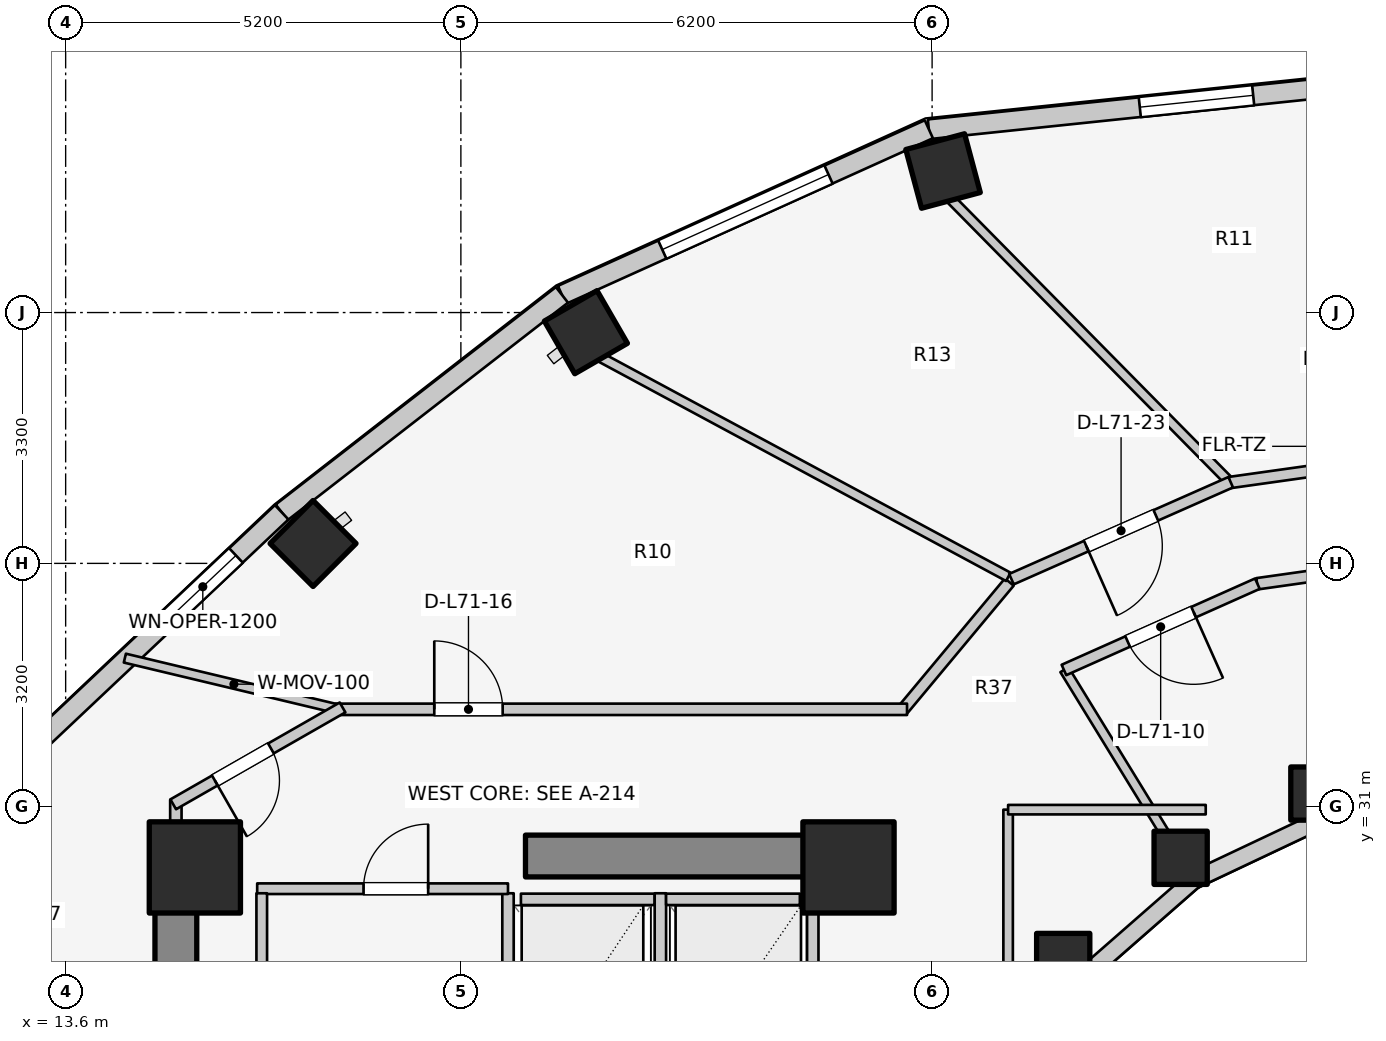
"""IFC4 building model, lengths in metres.
Left out: names, types, materials, properties, quantities, classifications, styles, units other than length and angle.
Written with IfcOpenShell. Run it as: python <this file> out.ifc"""

import sys

from ifc_helpers import new_model, si_unit, direction, frame, frame_2d, origin, origin_2d, place, context, subcontext, project, spatial, rectangle, extrude, element, fill, save


model = new_model("IFC4")
c1 = context("Model", 3, precision=1e-05, world=origin(), true_north=direction((0.0, 1.0)))
c2 = subcontext(c1, "Body", "Model", "MODEL_VIEW")
j1 = project(units=[si_unit("LENGTHUNIT", "METRE"), si_unit("PLANEANGLEUNIT", "RADIAN")], contexts=[c1])
p1 = place(None, origin())
s1 = spatial("IfcSite", under=j1, at=p1, CompositionType="ELEMENT")
p2 = place(p1, origin())
s2 = spatial("IfcBuilding", under=s1, at=p2, CompositionType="ELEMENT")
p3 = place(p2, frame((0.0, 0.0, 232.6)))
s3 = spatial("IfcBuildingStorey", under=s2, at=p3, CompositionType="ELEMENT", Elevation=232.6)
p4 = place(p3, frame((15.05, 17.05, 0.0), z_axis=(0.0, 0.0, 1.0), x_axis=(0.0, 1.0, 0.0)))
e1 = element("IfcWall", 1, at=p4, inside=s3, PredefinedType="SHEAR", context=c2, shape_type="SweptSolid", body=[
    extrude(rectangle(XDim=12.8, YDim=0.55, at=frame_2d((6.4, 0.0))), origin(), (0.0, 0.0, 1.0), 3.1),
])
p5 = place(p3, frame((19.65, 30.35, 0.0), z_axis=(0.0, 0.0, 1.0), x_axis=(1.0, 0.0, 0.0)))
e2 = element("IfcWall", 2, at=p5, inside=s3, PredefinedType="SHEAR", context=c2, shape_type="SweptSolid", body=[
    extrude(rectangle(XDim=4.5, YDim=0.55, at=frame_2d((2.25, 0.0))), origin(), (0.0, 0.0, 1.0), 3.1),
])
for number, where, z_axis, x_axis in (
    (3, (23.9, 30.2, 0.0), (0.0, 0.0, 1.0), (1.0, 0.0, 0.0)),
    (4, (15.3, 30.2, 0.0), (0.0, 0.0, 1.0), (1.0, 0.0, 0.0)),
):
    element("IfcColumn", number, at=place(p3, frame(where, z_axis=z_axis, x_axis=x_axis)), inside=s3, PredefinedType="COLUMN", context=c2, shape_type="SweptSolid", body=[
        extrude(rectangle(XDim=1.2, YDim=1.2, at=origin_2d()), origin(), (0.0, 0.0, 1.0), 3.1),
    ])
p6 = place(p3, frame((30.069, 31.172, 0.0), z_axis=(0.0, 0.0, 1.0), x_axis=(1.0, 0.0, 0.0)))
e5 = element("IfcColumn", 5, at=p6, inside=s3, PredefinedType="COLUMN", context=c2, shape_type="SweptSolid", body=[
    extrude(rectangle(XDim=0.7, YDim=0.7, at=origin_2d()), origin(), (0.0, 0.0, 1.0), 3.1),
])
p7 = place(p3, frame((25.144, 39.362, 0.0), z_axis=(0.0, 0.0, 1.0), x_axis=(-0.258819045103, 0.965925826289, 0.0)))
e6 = element("IfcColumn", 6, at=p7, inside=s3, PredefinedType="COLUMN", context=c2, shape_type="SweptSolid", body=[
    extrude(rectangle(XDim=0.8, YDim=0.8, at=origin_2d()), origin(), (0.0, 0.0, 1.0), 3.1),
])
p8 = place(p3, frame((28.27, 30.327, 0.0), z_axis=(0.0, 0.0, 1.0), x_axis=(1.0, 0.0, 0.0)))
e7 = element("IfcColumn", 7, at=p8, inside=s3, PredefinedType="COLUMN", context=c2, shape_type="SweptSolid", body=[
    extrude(rectangle(XDim=0.7, YDim=0.7, at=origin_2d()), origin(), (0.0, 0.0, 1.0), 3.1),
])
p9 = place(p3, frame((20.445, 37.241, 0.0), z_axis=(0.0, 0.0, 1.0), x_axis=(-0.5, 0.866025403784, 0.0)))
e8 = element("IfcColumn", 8, at=p9, inside=s3, PredefinedType="COLUMN", context=c2, shape_type="SweptSolid", body=[
    extrude(rectangle(XDim=0.8, YDim=0.8, at=origin_2d()), origin(), (0.0, 0.0, 1.0), 3.1),
])
p10 = place(p3, frame((26.725, 28.982, 0.0), z_axis=(0.0, 0.0, 1.0), x_axis=(1.0, 0.0, 0.0)))
e9 = element("IfcColumn", 9, at=p10, inside=s3, PredefinedType="COLUMN", context=c2, shape_type="SweptSolid", body=[
    extrude(rectangle(XDim=0.7, YDim=0.7, at=origin_2d()), origin(), (0.0, 0.0, 1.0), 3.1),
])
p11 = place(p3, frame((16.855, 34.462, 0.0), z_axis=(0.0, 0.0, 1.0), x_axis=(-0.707106781187, 0.707106781187, 0.0)))
e10 = element("IfcColumn", 10, at=p11, inside=s3, PredefinedType="COLUMN", context=c2, shape_type="SweptSolid", body=[
    extrude(rectangle(XDim=0.8, YDim=0.8, at=origin_2d()), origin(), (0.0, 0.0, 1.0), 3.1),
])
p12 = place(p3, frame((30.157, 30.843, 0.0), z_axis=(0.0, 0.0, 1.0), x_axis=(-0.904179699603, -0.427152280606, 0.0)))
e11 = element("IfcWall", 11, at=p12, inside=s3, PredefinedType="STANDARD", context=c2, shape_type="SweptSolid", body=[
    extrude(rectangle(XDim=1.899, YDim=0.23, at=frame_2d((0.95, 0.0))), origin(), (0.0, 0.0, 1.0), 2.16),
])
p13 = place(p3, frame((28.44, 30.032, 0.0), z_axis=(0.0, 0.0, 1.0), x_axis=(-0.752576694707, -0.658504607869, 0.0)))
e12 = element("IfcWall", 12, at=p13, inside=s3, PredefinedType="STANDARD", context=c2, shape_type="SweptSolid", body=[
    extrude(rectangle(XDim=1.959, YDim=0.23, at=frame_2d((0.98, 0.0))), origin(), (0.0, 0.0, 1.0), 2.16),
])
p14 = place(p3, frame((32.0, 40.648, 0.0), z_axis=(0.0, 0.0, 1.0), x_axis=(-0.994582822721, -0.103947144014, 0.0)))
e13 = element("IfcWall", 13, at=p14, inside=s3, PredefinedType="STANDARD", context=c2, shape_type="SweptSolid", body=[
    extrude(rectangle(XDim=7.081, YDim=0.26, at=frame_2d((3.541, 0.0))), origin(), (0.0, 0.0, 1.0), 2.85),
])
p15 = place(p14, frame((2.791, 0.0, 0.75)))
e14 = element("IfcOpeningElement", 14, at=p15, cuts=e13, PredefinedType="OPENING", context=c2, shape_type="SweptSolid", body=[
    extrude(rectangle(XDim=1.5, YDim=1.6, at=frame_2d((0.75, 0.8))), frame((0.0, 0.14, 0.0), z_axis=(0.0, -1.0, 0.0), x_axis=(1.0, 0.0, 0.0)), (0.0, 0.0, 1.0), 0.28),
])
p16 = place(p3, frame((24.957, 39.912, 0.0), z_axis=(0.0, 0.0, 1.0), x_axis=(-0.911427484938, -0.411460738952, 0.0)))
e15 = element("IfcWall", 15, at=p16, inside=s3, PredefinedType="STANDARD", context=c2, shape_type="SweptSolid", body=[
    extrude(rectangle(XDim=5.296, YDim=0.26, at=frame_2d((2.648, 0.0))), origin(), (0.0, 0.0, 1.0), 2.85),
])
p17 = place(p16, frame((1.448, 0.0, 0.75)))
e16 = element("IfcOpeningElement", 16, at=p17, cuts=e15, PredefinedType="OPENING", context=c2, shape_type="SweptSolid", body=[
    extrude(rectangle(XDim=2.4, YDim=1.7, at=frame_2d((1.2, 0.85))), frame((0.0, 0.14, 0.0), z_axis=(0.0, -1.0, 0.0), x_axis=(1.0, 0.0, 0.0)), (0.0, 0.0, 1.0), 0.28),
])
p18 = place(p3, frame((20.13, 37.733, 0.0), z_axis=(0.0, 0.0, 1.0), x_axis=(-0.790126214723, -0.612944177563, 0.0)))
e17 = element("IfcWall", 17, at=p18, inside=s3, PredefinedType="STANDARD", context=c2, shape_type="SweptSolid", body=[
    extrude(rectangle(XDim=4.667, YDim=0.26, at=frame_2d((2.333, 0.0))), origin(), (0.0, 0.0, 1.0), 2.85),
])
p19 = place(p3, frame((16.442, 34.872, 0.0), z_axis=(0.0, 0.0, 1.0), x_axis=(-0.72731899451, -0.686299555752, 0.0)))
e18 = element("IfcWall", 18, at=p19, inside=s3, PredefinedType="STANDARD", context=c2, shape_type="SweptSolid", body=[
    extrude(rectangle(XDim=4.404, YDim=0.26, at=frame_2d((2.202, 0.0))), origin(), (0.0, 0.0, 1.0), 2.85),
])
p20 = place(p19, frame((0.827, 0.0, 0.75)))
e19 = element("IfcOpeningElement", 19, at=p20, cuts=e18, PredefinedType="OPENING", context=c2, shape_type="SweptSolid", body=[
    extrude(rectangle(XDim=1.2, YDim=1.5, at=frame_2d((0.6, 0.75))), frame((0.0, 0.14, 0.0), z_axis=(0.0, -1.0, 0.0), x_axis=(1.0, 0.0, 0.0)), (0.0, 0.0, 1.0), 0.28),
])
p21 = place(p3, frame((19.59, 29.78, 0.0), z_axis=(0.0, 0.0, 1.0), x_axis=(1.0, 0.0, 0.0)))
e20 = element("IfcWall", 20, at=p21, inside=s3, PredefinedType="SOLIDWALL", context=c2, shape_type="SweptSolid", body=[
    extrude(rectangle(XDim=1.76, YDim=0.15, at=frame_2d((0.88, 0.0))), origin(), (0.0, 0.0, 1.0), 2.855),
])
for number, where, z_axis, x_axis in (
    (21, (19.42, 27.14, 0.0), (0.0, 0.0, 1.0), (0.0, 1.0, 0.0)),
    (22, (21.425, 27.14, 0.0), (0.0, 0.0, 1.0), (0.0, 1.0, 0.0)),
):
    element("IfcWall", number, at=place(p3, frame(where, z_axis=z_axis, x_axis=x_axis)), inside=s3, PredefinedType="SOLIDWALL", context=c2, shape_type="SweptSolid", body=[
        extrude(rectangle(XDim=2.72, YDim=0.15, at=frame_2d((1.36, 0.0))), origin(), (0.0, 0.0, 1.0), 2.855),
    ])
p22 = place(p3, frame((21.5, 29.78, 0.0), z_axis=(0.0, 0.0, 1.0), x_axis=(1.0, 0.0, 0.0)))
e23 = element("IfcWall", 23, at=p22, inside=s3, PredefinedType="SOLIDWALL", context=c2, shape_type="SweptSolid", body=[
    extrude(rectangle(XDim=1.76, YDim=0.15, at=frame_2d((0.88, 0.0))), origin(), (0.0, 0.0, 1.0), 2.855),
])
p23 = place(p3, frame((23.43, 27.14, 0.0), z_axis=(0.0, 0.0, 1.0), x_axis=(0.0, 1.0, 0.0)))
e24 = element("IfcWall", 24, at=p23, inside=s3, PredefinedType="SOLIDWALL", context=c2, shape_type="SweptSolid", body=[
    extrude(rectangle(XDim=2.72, YDim=0.15, at=frame_2d((1.36, 0.0))), origin(), (0.0, 0.0, 1.0), 2.855),
])
p24 = place(p3, frame((16.12, 29.92, 0.0), z_axis=(0.0, 0.0, 1.0), x_axis=(1.0, 0.0, 0.0)))
e25 = element("IfcWall", 25, at=p24, inside=s3, PredefinedType="PLUMBINGWALL", context=c2, shape_type="SweptSolid", body=[
    extrude(rectangle(XDim=3.3, YDim=0.14, at=frame_2d((1.65, 0.0))), origin(), (0.0, 0.0, 1.0), 2.855),
])
p25 = place(p24, frame((1.399, 0.0, 0.0)))
e26 = element("IfcOpeningElement", 26, at=p25, cuts=e25, PredefinedType="OPENING", context=c2, shape_type="SweptSolid", body=[
    extrude(rectangle(XDim=0.85, YDim=2.05, at=frame_2d((0.425, 1.025))), frame((0.0, 0.08, 0.0), z_axis=(0.0, -1.0, 0.0), x_axis=(1.0, 0.0, 0.0)), (0.0, 0.0, 1.0), 0.16),
])
p26 = place(p3, frame((16.18, 25.98, 0.0), z_axis=(0.0, 0.0, 1.0), x_axis=(0.0, 1.0, 0.0)))
e27 = element("IfcWall", 27, at=p26, inside=s3, PredefinedType="PLUMBINGWALL", context=c2, shape_type="SweptSolid", body=[
    extrude(rectangle(XDim=3.88, YDim=0.14, at=frame_2d((1.94, 0.0))), origin(), (0.0, 0.0, 1.0), 2.855),
])
p27 = place(p3, frame((28.45, 30.015, 0.0), z_axis=(0.0, 0.0, 1.0), x_axis=(-0.522763432117, 0.852477796802, 0.0)))
e28 = element("IfcWall", 28, at=p27, inside=s3, PredefinedType="PARTITIONING", context=c2, shape_type="SweptSolid", body=[
    extrude(rectangle(XDim=3.269, YDim=0.125, at=frame_2d((1.635, 0.0))), origin(), (0.0, 0.0, 1.0), 2.376),
])
p28 = place(p3, frame((32.007, 34.318, 0.0), z_axis=(0.0, 0.0, 1.0), x_axis=(-0.990150268487, -0.140008734782, 0.0)))
e29 = element("IfcWall", 29, at=p28, inside=s3, PredefinedType="PARTITIONING", context=c2, shape_type="SweptSolid", body=[
    extrude(rectangle(XDim=2.759, YDim=0.15, at=frame_2d((1.379, 0.0))), origin(), (0.0, 0.0, 1.0), 2.376),
])
p29 = place(p3, frame((29.28, 33.933, 0.0), z_axis=(0.0, 0.0, 1.0), x_axis=(-0.913254317828, -0.407389924971, 0.0)))
e30 = element("IfcWall", 30, at=p29, inside=s3, PredefinedType="PARTITIONING", context=c2, shape_type="SweptSolid", body=[
    extrude(rectangle(XDim=2.787, YDim=0.15, at=frame_2d((1.393, 0.0))), origin(), (0.0, 0.0, 1.0), 2.376),
])
p30 = place(p29, frame((0.918, 0.0, 0.0)))
e31 = element("IfcOpeningElement", 31, at=p30, cuts=e30, PredefinedType="OPENING", context=c2, shape_type="SweptSolid", body=[
    extrude(rectangle(XDim=0.95, YDim=2.1, at=frame_2d((0.475, 1.05))), frame((0.0, 0.085, 0.0), z_axis=(0.0, -1.0, 0.0), x_axis=(1.0, 0.0, 0.0)), (0.0, 0.0, 1.0), 0.17),
])
p31 = place(p3, frame((26.0, 25.8, 0.0), z_axis=(0.0, 0.0, 1.0), x_axis=(0.0, 1.0, 0.0)))
e32 = element("IfcWall", 32, at=p31, inside=s3, PredefinedType="PARTITIONING", context=c2, shape_type="SweptSolid", body=[
    extrude(rectangle(XDim=5.16, YDim=0.125, at=frame_2d((2.58, 0.0))), origin(), (0.0, 0.0, 1.0), 2.232),
])
p32 = place(p3, frame((26.0, 30.96, 0.0), z_axis=(0.0, 0.0, 1.0), x_axis=(1.0, 0.0, 0.0)))
e33 = element("IfcWall", 33, at=p32, inside=s3, PredefinedType="PARTITIONING", context=c2, shape_type="SweptSolid", body=[
    extrude(rectangle(XDim=2.6, YDim=0.125, at=frame_2d((1.3, 0.0))), origin(), (0.0, 0.0, 1.0), 2.376),
])
p33 = place(p3, frame((15.05, 29.8, 0.0), z_axis=(0.0, 0.0, 1.0), x_axis=(0.0, 1.0, 0.0)))
e34 = element("IfcWall", 34, at=p33, inside=s3, PredefinedType="PARTITIONING", context=c2, shape_type="SweptSolid", body=[
    extrude(rectangle(XDim=1.29, YDim=0.15, at=frame_2d((0.645, 0.0))), origin(), (0.0, 0.0, 1.0), 2.855),
])
p34 = place(p3, frame((17.249, 32.268, 0.0), z_axis=(0.0, 0.0, 1.0), x_axis=(-0.972648835931, 0.232280524286, 0.0)))
e35 = element("IfcWall", 35, at=p34, inside=s3, PredefinedType="MOVABLE", context=c2, shape_type="SweptSolid", body=[
    extrude(rectangle(XDim=2.95, YDim=0.12, at=frame_2d((1.475, 0.0))), origin(), (0.0, 0.0, 1.0), 2.22),
])
p35 = place(p3, frame((26.016, 33.955, 0.0), z_axis=(0.0, 0.0, 1.0), x_axis=(-0.64030392053, -0.76812166312, 0.0)))
e36 = element("IfcWall", 36, at=p35, inside=s3, PredefinedType="PARTITIONING", context=c2, shape_type="SweptSolid", body=[
    extrude(rectangle(XDim=2.21, YDim=0.15, at=frame_2d((1.105, 0.0))), origin(), (0.0, 0.0, 1.0), 2.376),
])
p36 = place(p3, frame((17.15, 32.28, 0.0), z_axis=(0.0, 0.0, 1.0), x_axis=(1.0, 0.0, 0.0)))
e37 = element("IfcWall", 37, at=p36, inside=s3, PredefinedType="PARTITIONING", context=c2, shape_type="SweptSolid", body=[
    extrude(rectangle(XDim=7.52, YDim=0.15, at=frame_2d((3.76, 0.0))), origin(), (0.0, 0.0, 1.0), 2.376),
])
p37 = place(p36, frame((1.3, 0.0, 0.0)))
e38 = element("IfcOpeningElement", 38, at=p37, cuts=e37, PredefinedType="OPENING", context=c2, shape_type="SweptSolid", body=[
    extrude(rectangle(XDim=0.9, YDim=2.1, at=frame_2d((0.45, 1.05))), frame((0.0, 0.085, 0.0), z_axis=(0.0, -1.0, 0.0), x_axis=(1.0, 0.0, 0.0)), (0.0, 0.0, 1.0), 0.17),
])
p38 = place(p3, frame((17.243, 32.305, 0.0), z_axis=(0.0, 0.0, 1.0), x_axis=(-0.867991349648, -0.496579315857, 0.0)))
e39 = element("IfcWall", 39, at=p38, inside=s3, PredefinedType="PARTITIONING", context=c2, shape_type="SweptSolid", body=[
    extrude(rectangle(XDim=2.567, YDim=0.15, at=frame_2d((1.283, 0.0))), origin(), (0.0, 0.0, 1.0), 2.22),
])
p39 = place(p38, frame((1.086, 0.0, 0.0)))
e40 = element("IfcOpeningElement", 40, at=p39, cuts=e39, PredefinedType="OPENING", context=c2, shape_type="SweptSolid", body=[
    extrude(rectangle(XDim=0.85, YDim=2.05, at=frame_2d((0.425, 1.025))), frame((0.0, 0.085, 0.0), z_axis=(0.0, -1.0, 0.0), x_axis=(1.0, 0.0, 0.0)), (0.0, 0.0, 1.0), 0.17),
])
p40 = place(p3, frame((28.882, 35.304, 0.0), z_axis=(0.0, 0.0, 1.0), x_axis=(-0.702191571271, 0.711988059756, 0.0)))
e41 = element("IfcWall", 41, at=p40, inside=s3, PredefinedType="PARTITIONING", context=c2, shape_type="SweptSolid", body=[
    extrude(rectangle(XDim=5.184, YDim=0.125, at=frame_2d((2.592, 0.0))), origin(), (0.0, 0.0, 1.0), 2.376),
])
p41 = place(p3, frame((26.003, 34.023, 0.0), z_axis=(0.0, 0.0, 1.0), x_axis=(-0.880531534665, 0.473987569943, 0.0)))
e42 = element("IfcWall", 42, at=p41, inside=s3, PredefinedType="PARTITIONING", context=c2, shape_type="SweptSolid", body=[
    extrude(rectangle(XDim=6.096, YDim=0.125, at=frame_2d((3.048, 0.0))), origin(), (0.0, 0.0, 1.0), 2.376),
])
p42 = place(p3, frame((32.008, 35.698, 0.0), z_axis=(0.0, 0.0, 1.0), x_axis=(-0.990268690673, -0.139168675614, 0.0)))
e43 = element("IfcWall", 43, at=p42, inside=s3, PredefinedType="PARTITIONING", context=c2, shape_type="SweptSolid", body=[
    extrude(rectangle(XDim=3.126, YDim=0.15, at=frame_2d((1.563, 0.0))), origin(), (0.0, 0.0, 1.0), 2.376),
])
p43 = place(p42, frame((1.063, 0.0, 0.0)))
e44 = element("IfcOpeningElement", 44, at=p43, cuts=e43, PredefinedType="OPENING", context=c2, shape_type="SweptSolid", body=[
    extrude(rectangle(XDim=1.0, YDim=2.1, at=frame_2d((0.5, 1.05))), frame((0.0, 0.085, 0.0), z_axis=(0.0, -1.0, 0.0), x_axis=(1.0, 0.0, 0.0)), (0.0, 0.0, 1.0), 0.17),
])
p44 = place(p3, frame((28.929, 35.268, 0.0), z_axis=(0.0, 0.0, 1.0), x_axis=(-0.914642679993, -0.404263240891, 0.0)))
e45 = element("IfcWall", 45, at=p44, inside=s3, PredefinedType="PARTITIONING", context=c2, shape_type="SweptSolid", body=[
    extrude(rectangle(XDim=3.154, YDim=0.15, at=frame_2d((1.577, 0.0))), origin(), (0.0, 0.0, 1.0), 2.376),
])
p45 = place(p44, frame((1.077, 0.0, 0.0)))
e46 = element("IfcOpeningElement", 46, at=p45, cuts=e45, PredefinedType="OPENING", context=c2, shape_type="SweptSolid", body=[
    extrude(rectangle(XDim=1.0, YDim=2.1, at=frame_2d((0.5, 1.05))), frame((0.0, 0.085, 0.0), z_axis=(0.0, -1.0, 0.0), x_axis=(1.0, 0.0, 0.0)), (0.0, 0.0, 1.0), 0.17),
])
p46 = place(p15, origin())
e47 = element("IfcWindow", 47, at=p46, inside=s3, PartitioningType="SINGLE_PANEL", PredefinedType="WINDOW", context=c2, shape_type="SweptSolid", body=[
    extrude(rectangle(XDim=1.5, YDim=1.6, at=frame_2d((0.75, 0.8))), frame((0.0, 0.03, 0.0), z_axis=(0.0, -1.0, 0.0), x_axis=(1.0, 0.0, 0.0)), (0.0, 0.0, 1.0), 0.06),
])
fill(e14, e47)
p47 = place(p17, origin())
e48 = element("IfcWindow", 48, at=p47, inside=s3, PartitioningType="SINGLE_PANEL", PredefinedType="WINDOW", context=c2, shape_type="SweptSolid", body=[
    extrude(rectangle(XDim=2.4, YDim=1.7, at=frame_2d((1.2, 0.85))), frame((0.0, 0.03, 0.0), z_axis=(0.0, -1.0, 0.0), x_axis=(1.0, 0.0, 0.0)), (0.0, 0.0, 1.0), 0.06),
])
fill(e16, e48)
p48 = place(p20, origin())
e49 = element("IfcWindow", 49, at=p48, inside=s3, PartitioningType="SINGLE_PANEL", PredefinedType="WINDOW", context=c2, shape_type="SweptSolid", body=[
    extrude(rectangle(XDim=1.2, YDim=1.5, at=frame_2d((0.6, 0.75))), frame((0.0, 0.03, 0.0), z_axis=(0.0, -1.0, 0.0), x_axis=(1.0, 0.0, 0.0)), (0.0, 0.0, 1.0), 0.06),
])
fill(e19, e49)
p49 = place(p25, origin())
e50 = element("IfcDoor", 50, at=p49, inside=s3, OperationType="SINGLE_SWING_RIGHT", PredefinedType="DOOR", context=c2, shape_type="SweptSolid", body=[
    extrude(rectangle(XDim=0.85, YDim=2.05, at=frame_2d((0.425, 1.025))), frame((0.0, 0.025, 0.0), z_axis=(0.0, -1.0, 0.0), x_axis=(1.0, 0.0, 0.0)), (0.0, 0.0, 1.0), 0.05),
])
fill(e26, e50)
p50 = place(p30, origin())
e51 = element("IfcDoor", 51, at=p50, inside=s3, OperationType="SINGLE_SWING_LEFT", PredefinedType="DOOR", context=c2, shape_type="SweptSolid", body=[
    extrude(rectangle(XDim=0.95, YDim=2.1, at=frame_2d((0.475, 1.05))), frame((0.0, 0.025, 0.0), z_axis=(0.0, -1.0, 0.0), x_axis=(1.0, 0.0, 0.0)), (0.0, 0.0, 1.0), 0.05),
])
fill(e31, e51)
p51 = place(p37, origin())
e52 = element("IfcDoor", 52, at=p51, inside=s3, OperationType="SINGLE_SWING_LEFT", PredefinedType="DOOR", context=c2, shape_type="SweptSolid", body=[
    extrude(rectangle(XDim=0.9, YDim=2.1, at=frame_2d((0.45, 1.05))), frame((0.0, 0.025, 0.0), z_axis=(0.0, -1.0, 0.0), x_axis=(1.0, 0.0, 0.0)), (0.0, 0.0, 1.0), 0.05),
])
fill(e38, e52)
p52 = place(p39, origin())
e53 = element("IfcDoor", 53, at=p52, inside=s3, OperationType="SINGLE_SWING_RIGHT", PredefinedType="DOOR", context=c2, shape_type="SweptSolid", body=[
    extrude(rectangle(XDim=0.85, YDim=2.05, at=frame_2d((0.425, 1.025))), frame((0.0, 0.025, 0.0), z_axis=(0.0, -1.0, 0.0), x_axis=(1.0, 0.0, 0.0)), (0.0, 0.0, 1.0), 0.05),
])
fill(e40, e53)
p53 = place(p45, origin())
e54 = element("IfcDoor", 54, at=p53, inside=s3, OperationType="SINGLE_SWING_RIGHT", PredefinedType="DOOR", context=c2, shape_type="SweptSolid", body=[
    extrude(rectangle(XDim=1.0, YDim=2.1, at=frame_2d((0.5, 1.05))), frame((0.0, 0.025, 0.0), z_axis=(0.0, -1.0, 0.0), x_axis=(1.0, 0.0, 0.0)), (0.0, 0.0, 1.0), 0.05),
])
fill(e46, e54)
save(model, sys.argv[1])
